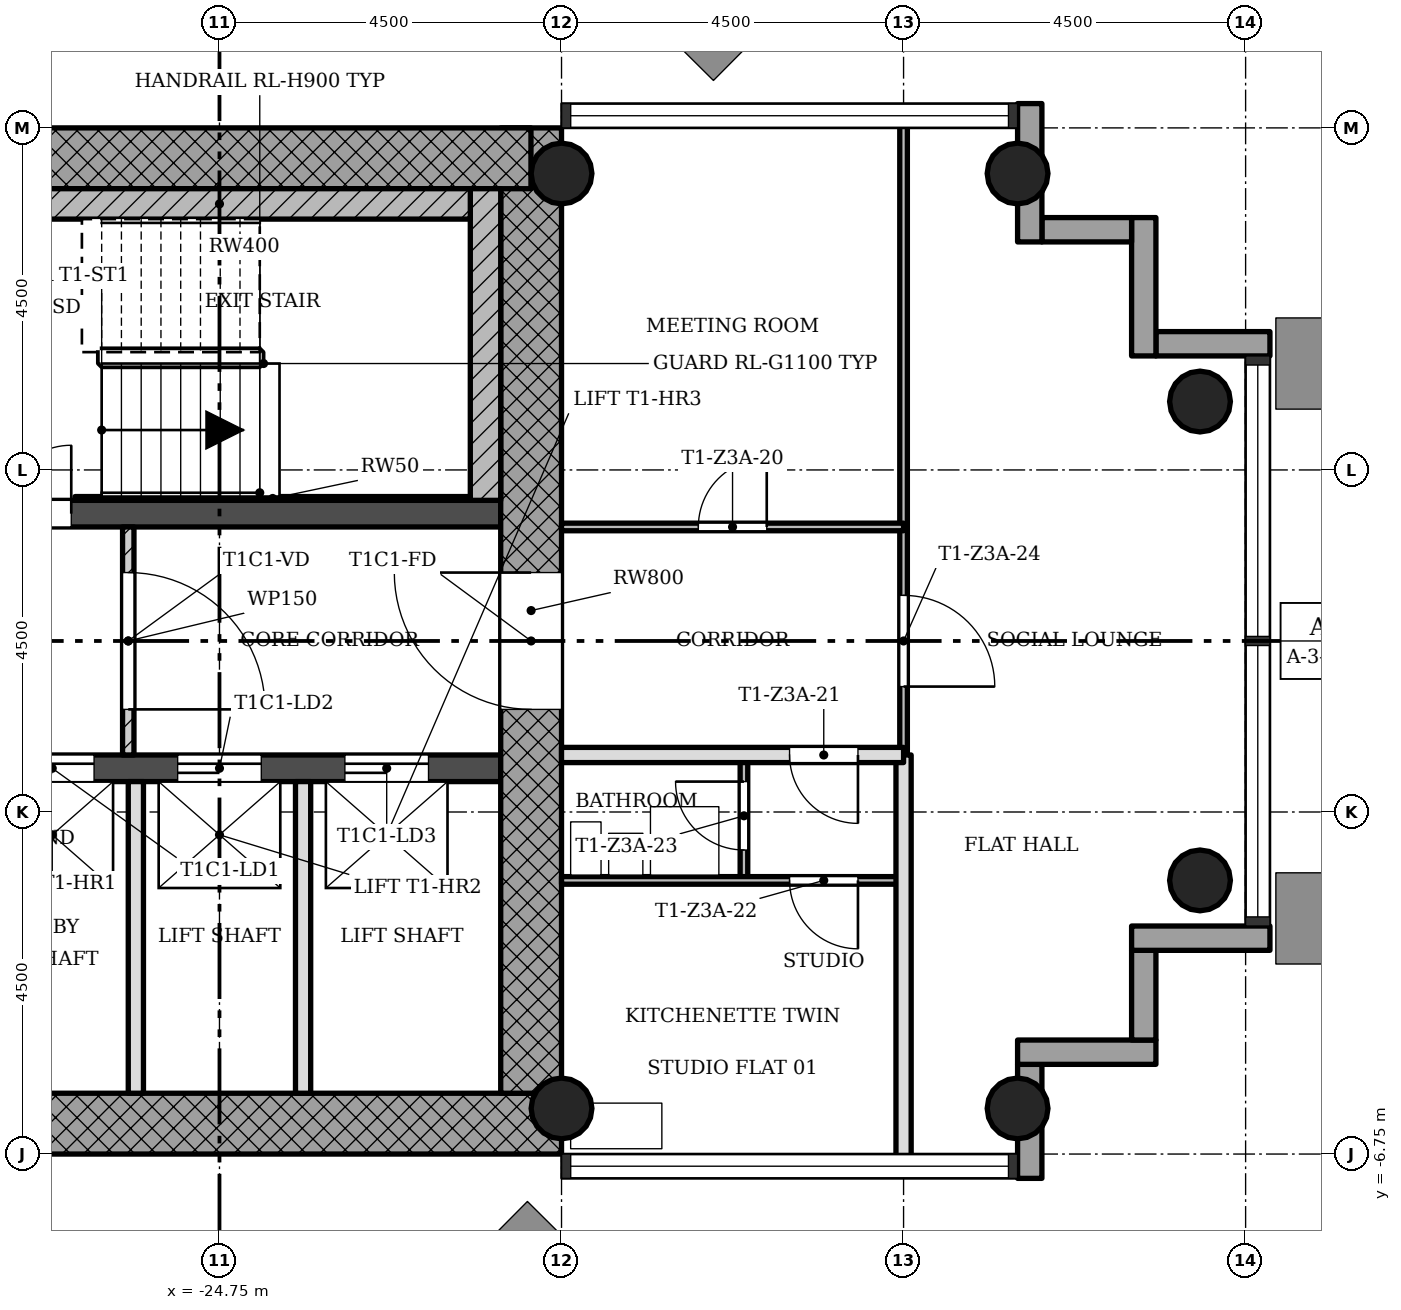
"""IFC4 building model, lengths in metres.
Left out: names, types, materials, properties, quantities, classifications, styles, units other than length and angle.
Written with IfcOpenShell. Run it as: python <this file> out.ifc"""

import sys

from ifc_helpers import new_model, si_unit, direction, frame, frame_2d, origin, origin_2d, place, context, subcontext, project, spatial, rectangle, hollow_circle, extrude, element, fill, save


model = new_model("IFC4")
c1 = context("Model", 3, precision=1e-05, world=origin(), true_north=direction((0.0, 1.0)))
c2 = subcontext(c1, "Body", "Model", "MODEL_VIEW")
j1 = project(units=[si_unit("LENGTHUNIT", "METRE"), si_unit("PLANEANGLEUNIT", "RADIAN")], contexts=[c1])
p1 = place(None, origin())
s1 = spatial("IfcSite", under=j1, at=p1, CompositionType="ELEMENT")
p2 = place(p1, origin())
s2 = spatial("IfcBuilding", under=s1, at=p2, CompositionType="ELEMENT")
p3 = place(p2, frame((0.0, 0.0, 137.1)))
s3 = spatial("IfcBuildingStorey", under=s2, at=p3, CompositionType="ELEMENT", Elevation=137.1)
p4 = place(p3, frame((-28.45, -6.35, 0.0), z_axis=(0.0, 0.0, 1.0), x_axis=(1.0, 0.0, 0.0)))
e1 = element("IfcWall", 1, at=p4, inside=s3, PredefinedType="SHEAR", context=c2, shape_type="SweptSolid", body=[
    extrude(rectangle(XDim=8.2, YDim=0.8, at=frame_2d((4.1, 0.0))), origin(), (0.0, 0.0, 1.0), 3.4),
])
p5 = place(p3, frame((-20.65, -5.95, 0.0), z_axis=(0.0, 0.0, 1.0), x_axis=(0.0, 1.0, 0.0)))
e2 = element("IfcWall", 2, at=p5, inside=s3, PredefinedType="SHEAR", context=c2, shape_type="SweptSolid", body=[
    extrude(rectangle(XDim=12.7, YDim=0.8, at=frame_2d((6.35, 0.0))), origin(), (0.0, 0.0, 1.0), 3.4),
])
p6 = place(p5, frame((5.05, 0.0, 0.0)))
e3 = element("IfcOpeningElement", 3, at=p6, cuts=e2, PredefinedType="OPENING", context=c2, shape_type="SweptSolid", body=[
    extrude(rectangle(XDim=1.8, YDim=2.1, at=frame_2d((0.9, 1.05))), frame((0.0, 0.41, 0.0), z_axis=(0.0, -1.0, 0.0), x_axis=(1.0, 0.0, 0.0)), (0.0, 0.0, 1.0), 0.82),
])
p7 = place(p3, frame((-20.652, 6.35, 0.0), z_axis=(0.0, 0.0, 1.0), x_axis=(-1.0, 0.0, 0.0)))
e4 = element("IfcWall", 4, at=p7, inside=s3, PredefinedType="SHEAR", context=c2, shape_type="SweptSolid", body=[
    extrude(rectangle(XDim=8.796, YDim=0.8, at=frame_2d((4.398, 0.0))), origin(), (0.0, 0.0, 1.0), 3.4),
])
p8 = place(p3, frame((-28.45, -1.675, 0.0), z_axis=(0.0, 0.0, 1.0), x_axis=(1.0, 0.0, 0.0)))
e5 = element("IfcWall", 5, at=p8, inside=s3, PredefinedType="SHEAR", context=c2, shape_type="SweptSolid", body=[
    extrude(rectangle(XDim=7.4, YDim=0.35, at=frame_2d((3.7, 0.0))), origin(), (0.0, 0.0, 1.0), 3.4),
])
p9 = place(p8, frame((0.95, 0.0, 0.0)))
e6 = element("IfcOpeningElement", 6, at=p9, cuts=e5, PredefinedType="OPENING", context=c2, shape_type="SweptSolid", body=[
    extrude(rectangle(XDim=1.1, YDim=2.1, at=frame_2d((0.55, 1.05))), frame((0.0, 0.185, 0.0), z_axis=(0.0, -1.0, 0.0), x_axis=(1.0, 0.0, 0.0)), (0.0, 0.0, 1.0), 0.37),
])
p10 = place(p8, frame((3.15, 0.0, 0.0)))
e7 = element("IfcOpeningElement", 7, at=p10, cuts=e5, PredefinedType="OPENING", context=c2, shape_type="SweptSolid", body=[
    extrude(rectangle(XDim=1.1, YDim=2.1, at=frame_2d((0.55, 1.05))), frame((0.0, 0.185, 0.0), z_axis=(0.0, -1.0, 0.0), x_axis=(1.0, 0.0, 0.0)), (0.0, 0.0, 1.0), 0.37),
])
p11 = place(p8, frame((5.35, 0.0, 0.0)))
e8 = element("IfcOpeningElement", 8, at=p11, cuts=e5, PredefinedType="OPENING", context=c2, shape_type="SweptSolid", body=[
    extrude(rectangle(XDim=1.1, YDim=2.1, at=frame_2d((0.55, 1.05))), frame((0.0, 0.185, 0.0), z_axis=(0.0, -1.0, 0.0), x_axis=(1.0, 0.0, 0.0)), (0.0, 0.0, 1.0), 0.37),
])
p12 = place(p3, frame((-28.45, 1.675, 0.0), z_axis=(0.0, 0.0, 1.0), x_axis=(1.0, 0.0, 0.0)))
e9 = element("IfcWall", 9, at=p12, inside=s3, PredefinedType="SHEAR", context=c2, shape_type="SweptSolid", body=[
    extrude(rectangle(XDim=7.4, YDim=0.35, at=frame_2d((3.7, 0.0))), origin(), (0.0, 0.0, 1.0), 3.4),
])
p13 = place(p12, frame((0.85, 0.0, 0.0)))
e10 = element("IfcOpeningElement", 10, at=p13, cuts=e9, PredefinedType="OPENING", context=c2, shape_type="SweptSolid", body=[
    extrude(rectangle(XDim=0.9, YDim=2.1, at=frame_2d((0.45, 1.05))), frame((0.0, 0.185, 0.0), z_axis=(0.0, -1.0, 0.0), x_axis=(1.0, 0.0, 0.0)), (0.0, 0.0, 1.0), 0.37),
])
for number, where, z_axis, x_axis in (
    (11, (-20.25, -6.15, 0.0), (0.0, 0.0, 1.0), (1.0, 0.0, 0.0)),
    (12, (-20.25, 6.15, 0.0), (0.0, 0.0, 1.0), (1.0, 0.0, 0.0)),
    (13, (-14.25, -6.15, 0.0), (0.0, 0.0, 1.0), (1.0, 0.0, 0.0)),
    (14, (-14.25, 6.15, 0.0), (0.0, 0.0, 1.0), (1.0, 0.0, 0.0)),
    (15, (-11.85, -3.15, 0.0), (0.0, 0.0, 1.0), (1.0, 0.0, 0.0)),
    (16, (-11.85, 3.15, 0.0), (0.0, 0.0, 1.0), (1.0, 0.0, 0.0)),
):
    element("IfcColumn", number, at=place(p3, frame(where, z_axis=z_axis, x_axis=x_axis)), inside=s3, PredefinedType="COLUMN", context=c2, shape_type="SweptSolid", body=[
        extrude(hollow_circle(Radius=0.4, WallThickness=0.028, at=origin_2d()), origin(), (0.0, 0.0, 1.0), 3.4),
    ])
p14 = place(p3, frame((-14.09, -7.07, -0.3), z_axis=(0.0, 0.0, 1.0), x_axis=(0.0, 1.0, 0.0)))
e17 = element("IfcWall", 17, at=p14, inside=s3, PredefinedType="STANDARD", context=c2, shape_type="SweptSolid", body=[
    extrude(rectangle(XDim=1.5, YDim=0.32, at=frame_2d((0.75, 0.0))), origin(), (0.0, 0.0, 1.0), 3.4),
])
p15 = place(p3, frame((-14.25, -5.41, -0.3), z_axis=(0.0, 0.0, 1.0), x_axis=(1.0, 0.0, 0.0)))
e18 = element("IfcWall", 18, at=p15, inside=s3, PredefinedType="STANDARD", context=c2, shape_type="SweptSolid", body=[
    extrude(rectangle(XDim=1.82, YDim=0.32, at=frame_2d((0.91, 0.0))), origin(), (0.0, 0.0, 1.0), 3.4),
])
p16 = place(p3, frame((-12.59, -5.25, -0.3), z_axis=(0.0, 0.0, 1.0), x_axis=(0.0, 1.0, 0.0)))
e19 = element("IfcWall", 19, at=p16, inside=s3, PredefinedType="STANDARD", context=c2, shape_type="SweptSolid", body=[
    extrude(rectangle(XDim=1.18, YDim=0.32, at=frame_2d((0.59, 0.0))), origin(), (0.0, 0.0, 1.0), 3.4),
])
p17 = place(p3, frame((-12.75, -3.91, -0.3), z_axis=(0.0, 0.0, 1.0), x_axis=(1.0, 0.0, 0.0)))
e20 = element("IfcWall", 20, at=p17, inside=s3, PredefinedType="STANDARD", context=c2, shape_type="SweptSolid", body=[
    extrude(rectangle(XDim=1.82, YDim=0.32, at=frame_2d((0.91, 0.0))), origin(), (0.0, 0.0, 1.0), 3.4),
])
p18 = place(p3, frame((-10.93, 3.91, -0.3), z_axis=(0.0, 0.0, 1.0), x_axis=(-1.0, 0.0, 0.0)))
e21 = element("IfcWall", 21, at=p18, inside=s3, PredefinedType="STANDARD", context=c2, shape_type="SweptSolid", body=[
    extrude(rectangle(XDim=1.5, YDim=0.32, at=frame_2d((0.75, 0.0))), origin(), (0.0, 0.0, 1.0), 3.4),
])
p19 = place(p3, frame((-12.59, 3.75, -0.3), z_axis=(0.0, 0.0, 1.0), x_axis=(0.0, 1.0, 0.0)))
e22 = element("IfcWall", 22, at=p19, inside=s3, PredefinedType="STANDARD", context=c2, shape_type="SweptSolid", body=[
    extrude(rectangle(XDim=1.82, YDim=0.32, at=frame_2d((0.91, 0.0))), origin(), (0.0, 0.0, 1.0), 3.4),
])
p20 = place(p3, frame((-12.75, 5.41, -0.3), z_axis=(0.0, 0.0, 1.0), x_axis=(-1.0, 0.0, 0.0)))
e23 = element("IfcWall", 23, at=p20, inside=s3, PredefinedType="STANDARD", context=c2, shape_type="SweptSolid", body=[
    extrude(rectangle(XDim=1.18, YDim=0.32, at=frame_2d((0.59, 0.0))), origin(), (0.0, 0.0, 1.0), 3.4),
])
p21 = place(p3, frame((-14.09, 5.25, -0.3), z_axis=(0.0, 0.0, 1.0), x_axis=(0.0, 1.0, 0.0)))
e24 = element("IfcWall", 24, at=p21, inside=s3, PredefinedType="STANDARD", context=c2, shape_type="SweptSolid", body=[
    extrude(rectangle(XDim=1.82, YDim=0.32, at=frame_2d((0.91, 0.0))), origin(), (0.0, 0.0, 1.0), 3.4),
])
p22 = place(p3, frame((-25.95, -1.5, 0.0), z_axis=(0.0, 0.0, 1.0), x_axis=(0.0, 1.0, 0.0)))
e25 = element("IfcWall", 25, at=p22, inside=s3, PredefinedType="PARTITIONING", context=c2, shape_type="SweptSolid", body=[
    extrude(rectangle(XDim=3.0, YDim=0.15, at=frame_2d((1.5, 0.0))), origin(), (0.0, 0.0, 1.0), 3.0),
])
p23 = place(p22, frame((0.6, 0.0, 0.0)))
e26 = element("IfcOpeningElement", 26, at=p23, cuts=e25, PredefinedType="OPENING", context=c2, shape_type="SweptSolid", body=[
    extrude(rectangle(XDim=1.8, YDim=2.1, at=frame_2d((0.9, 1.05))), frame((0.0, 0.085, 0.0), z_axis=(0.0, -1.0, 0.0), x_axis=(1.0, 0.0, 0.0)), (0.0, 0.0, 1.0), 0.17),
])
for number, where, z_axis, x_axis in (
    (27, (-25.85, -5.95, 0.0), (0.0, 0.0, 1.0), (0.0, 1.0, 0.0)),
    (28, (-23.65, -5.95, 0.0), (0.0, 0.0, 1.0), (0.0, 1.0, 0.0)),
):
    element("IfcWall", number, at=place(p3, frame(where, z_axis=z_axis, x_axis=x_axis)), inside=s3, PredefinedType="SOLIDWALL", context=c2, shape_type="SweptSolid", body=[
        extrude(rectangle(XDim=4.1, YDim=0.2, at=frame_2d((2.05, 0.0))), origin(), (0.0, 0.0, 1.0), 3.0),
    ])
p24 = place(p3, frame((-17.85, -3.15, 0.0), z_axis=(0.0, 0.0, 1.0), x_axis=(0.0, 1.0, 0.0)))
e29 = element("IfcWall", 29, at=p24, inside=s3, PredefinedType="PARTITIONING", context=c2, shape_type="SweptSolid", body=[
    extrude(rectangle(XDim=1.65, YDim=0.1, at=frame_2d((0.825, 0.0))), origin(), (0.0, 0.0, 1.0), 3.0),
])
p25 = place(p24, frame((0.4, 0.0, 0.0)))
e30 = element("IfcOpeningElement", 30, at=p25, cuts=e29, PredefinedType="OPENING", context=c2, shape_type="SweptSolid", body=[
    extrude(rectangle(XDim=0.9, YDim=2.1, at=frame_2d((0.45, 1.05))), frame((0.0, 0.06, 0.0), z_axis=(0.0, -1.0, 0.0), x_axis=(1.0, 0.0, 0.0)), (0.0, 0.0, 1.0), 0.12),
])
p26 = place(p3, frame((-15.75, -1.5, 0.0), z_axis=(0.0, 0.0, 1.0), x_axis=(0.0, 1.0, 0.0)))
e31 = element("IfcWall", 31, at=p26, inside=s3, PredefinedType="PARTITIONING", context=c2, shape_type="SweptSolid", body=[
    extrude(rectangle(XDim=8.35, YDim=0.1, at=frame_2d((4.175, 0.0))), origin(), (0.0, 0.0, 1.0), 3.0),
])
p27 = place(p26, frame((0.9, 0.0, 0.0)))
e32 = element("IfcOpeningElement", 32, at=p27, cuts=e31, PredefinedType="OPENING", context=c2, shape_type="SweptSolid", body=[
    extrude(rectangle(XDim=1.2, YDim=2.1, at=frame_2d((0.6, 1.05))), frame((0.0, 0.06, 0.0), z_axis=(0.0, -1.0, 0.0), x_axis=(1.0, 0.0, 0.0)), (0.0, 0.0, 1.0), 0.12),
])
p28 = place(p3, frame((-15.75, -6.85, 0.0), z_axis=(0.0, 0.0, 1.0), x_axis=(0.0, 1.0, 0.0)))
e33 = element("IfcWall", 33, at=p28, inside=s3, PredefinedType="SOLIDWALL", context=c2, shape_type="SweptSolid", body=[
    extrude(rectangle(XDim=5.35, YDim=0.2, at=frame_2d((2.675, 0.0))), origin(), (0.0, 0.0, 1.0), 3.0),
])
p29 = place(p3, frame((-20.25, -3.15, 0.0), z_axis=(0.0, 0.0, 1.0), x_axis=(1.0, 0.0, 0.0)))
e34 = element("IfcWall", 34, at=p29, inside=s3, PredefinedType="PARTITIONING", context=c2, shape_type="SweptSolid", body=[
    extrude(rectangle(XDim=4.5, YDim=0.1, at=frame_2d((2.25, 0.0))), origin(), (0.0, 0.0, 1.0), 3.0),
])
p30 = place(p29, frame((3.0, 0.0, 0.0)))
e35 = element("IfcOpeningElement", 35, at=p30, cuts=e34, PredefinedType="OPENING", context=c2, shape_type="SweptSolid", body=[
    extrude(rectangle(XDim=0.9, YDim=2.1, at=frame_2d((0.45, 1.05))), frame((0.0, 0.06, 0.0), z_axis=(0.0, -1.0, 0.0), x_axis=(1.0, 0.0, 0.0)), (0.0, 0.0, 1.0), 0.12),
])
p31 = place(p3, frame((-20.25, -1.5, 0.0), z_axis=(0.0, 0.0, 1.0), x_axis=(1.0, 0.0, 0.0)))
e36 = element("IfcWall", 36, at=p31, inside=s3, PredefinedType="SOLIDWALL", context=c2, shape_type="SweptSolid", body=[
    extrude(rectangle(XDim=4.5, YDim=0.2, at=frame_2d((2.25, 0.0))), origin(), (0.0, 0.0, 1.0), 3.0),
])
p32 = place(p31, frame((3.0, 0.0, 0.0)))
e37 = element("IfcOpeningElement", 37, at=p32, cuts=e36, PredefinedType="OPENING", context=c2, shape_type="SweptSolid", body=[
    extrude(rectangle(XDim=0.9, YDim=2.1, at=frame_2d((0.45, 1.05))), frame((0.0, 0.11, 0.0), z_axis=(0.0, -1.0, 0.0), x_axis=(1.0, 0.0, 0.0)), (0.0, 0.0, 1.0), 0.22),
])
p33 = place(p3, frame((-20.25, 1.5, 0.0), z_axis=(0.0, 0.0, 1.0), x_axis=(1.0, 0.0, 0.0)))
e38 = element("IfcWall", 38, at=p33, inside=s3, PredefinedType="PARTITIONING", context=c2, shape_type="SweptSolid", body=[
    extrude(rectangle(XDim=4.5, YDim=0.1, at=frame_2d((2.25, 0.0))), origin(), (0.0, 0.0, 1.0), 3.0),
])
p34 = place(p33, frame((1.8, 0.0, 0.0)))
e39 = element("IfcOpeningElement", 39, at=p34, cuts=e38, PredefinedType="OPENING", context=c2, shape_type="SweptSolid", body=[
    extrude(rectangle(XDim=0.9, YDim=2.1, at=frame_2d((0.45, 1.05))), frame((0.0, 0.06, 0.0), z_axis=(0.0, -1.0, 0.0), x_axis=(1.0, 0.0, 0.0)), (0.0, 0.0, 1.0), 0.12),
])
p35 = place(p3, frame((-21.25, 1.85, 0.0), z_axis=(0.0, 0.0, 1.0), x_axis=(0.0, 1.0, 0.0)))
e40 = element("IfcWall", 40, at=p35, inside=s3, PredefinedType="SHEAR", context=c2, shape_type="SweptSolid", body=[
    extrude(rectangle(XDim=4.1, YDim=0.4, at=frame_2d((2.05, 0.0))), origin(), (0.0, 0.0, 1.0), 3.4),
])
p36 = place(p3, frame((-28.05, 5.75, 0.0), z_axis=(0.0, 0.0, 1.0), x_axis=(1.0, 0.0, 0.0)))
e41 = element("IfcWall", 41, at=p36, inside=s3, PredefinedType="SHEAR", context=c2, shape_type="SweptSolid", body=[
    extrude(rectangle(XDim=6.6, YDim=0.4, at=frame_2d((3.3, 0.0))), origin(), (0.0, 0.0, 1.0), 3.4),
])
p37 = place(p3, frame((-26.65, 1.875, 0.0), z_axis=(0.0, 0.0, 1.0), x_axis=(1.0, 0.0, 0.0)))
e42 = element("IfcWall", 42, at=p37, inside=s3, PredefinedType="SHEAR", context=c2, shape_type="SweptSolid", body=[
    extrude(rectangle(XDim=5.2, YDim=0.05, at=frame_2d((2.6, 0.0))), origin(), (0.0, 0.0, 1.0), 3.4),
])
p38 = place(p23, origin())
e43 = element("IfcDoor", 43, at=p38, inside=s3, OperationType="SINGLE_SWING_LEFT", PredefinedType="DOOR", context=c2, shape_type="SweptSolid", body=[
    extrude(rectangle(XDim=1.8, YDim=2.1, at=frame_2d((0.9, 1.05))), frame((0.0, 0.025, 0.0), z_axis=(0.0, -1.0, 0.0), x_axis=(1.0, 0.0, 0.0)), (0.0, 0.0, 1.0), 0.05),
])
fill(e26, e43)
p39 = place(p34, origin())
e44 = element("IfcDoor", 44, at=p39, inside=s3, OperationType="SINGLE_SWING_LEFT", PredefinedType="DOOR", context=c2, shape_type="SweptSolid", body=[
    extrude(rectangle(XDim=0.9, YDim=2.1, at=frame_2d((0.45, 1.05))), frame((0.0, 0.025, 0.0), z_axis=(0.0, -1.0, 0.0), x_axis=(1.0, 0.0, 0.0)), (0.0, 0.0, 1.0), 0.05),
])
fill(e39, e44)
p40 = place(p32, origin())
e45 = element("IfcDoor", 45, at=p40, inside=s3, OperationType="SINGLE_SWING_RIGHT", PredefinedType="DOOR", context=c2, shape_type="SweptSolid", body=[
    extrude(rectangle(XDim=0.9, YDim=2.1, at=frame_2d((0.45, 1.05))), frame((0.0, 0.025, 0.0), z_axis=(0.0, -1.0, 0.0), x_axis=(1.0, 0.0, 0.0)), (0.0, 0.0, 1.0), 0.05),
])
fill(e37, e45)
p41 = place(p30, origin())
e46 = element("IfcDoor", 46, at=p41, inside=s3, OperationType="SINGLE_SWING_RIGHT", PredefinedType="DOOR", context=c2, shape_type="SweptSolid", body=[
    extrude(rectangle(XDim=0.9, YDim=2.1, at=frame_2d((0.45, 1.05))), frame((0.0, 0.025, 0.0), z_axis=(0.0, -1.0, 0.0), x_axis=(1.0, 0.0, 0.0)), (0.0, 0.0, 1.0), 0.05),
])
fill(e35, e46)
p42 = place(p25, origin())
e47 = element("IfcDoor", 47, at=p42, inside=s3, OperationType="SINGLE_SWING_LEFT", PredefinedType="DOOR", context=c2, shape_type="SweptSolid", body=[
    extrude(rectangle(XDim=0.9, YDim=2.1, at=frame_2d((0.45, 1.05))), frame((0.0, 0.025, 0.0), z_axis=(0.0, -1.0, 0.0), x_axis=(1.0, 0.0, 0.0)), (0.0, 0.0, 1.0), 0.05),
])
fill(e30, e47)
p43 = place(p27, origin())
e48 = element("IfcDoor", 48, at=p43, inside=s3, OperationType="SINGLE_SWING_LEFT", PredefinedType="DOOR", context=c2, shape_type="SweptSolid", body=[
    extrude(rectangle(XDim=1.2, YDim=2.1, at=frame_2d((0.6, 1.05))), frame((0.0, 0.025, 0.0), z_axis=(0.0, -1.0, 0.0), x_axis=(1.0, 0.0, 0.0)), (0.0, 0.0, 1.0), 0.05),
])
fill(e32, e48)
p44 = place(p13, origin())
e49 = element("IfcDoor", 49, at=p44, inside=s3, OperationType="SINGLE_SWING_LEFT", PredefinedType="DOOR", context=c2, shape_type="SweptSolid", body=[
    extrude(rectangle(XDim=0.9, YDim=2.1, at=frame_2d((0.45, 1.05))), frame((0.0, 0.025, 0.0), z_axis=(0.0, -1.0, 0.0), x_axis=(1.0, 0.0, 0.0)), (0.0, 0.0, 1.0), 0.05),
])
fill(e10, e49)
p45 = place(p9, origin())
e50 = element("IfcDoor", 50, at=p45, inside=s3, OperationType="SLIDING_TO_LEFT", PredefinedType="DOOR", context=c2, shape_type="SweptSolid", body=[
    extrude(rectangle(XDim=1.1, YDim=2.1, at=frame_2d((0.55, 1.05))), frame((0.0, 0.025, 0.0), z_axis=(0.0, -1.0, 0.0), x_axis=(1.0, 0.0, 0.0)), (0.0, 0.0, 1.0), 0.05),
])
fill(e6, e50)
p46 = place(p10, origin())
e51 = element("IfcDoor", 51, at=p46, inside=s3, OperationType="SLIDING_TO_LEFT", PredefinedType="DOOR", context=c2, shape_type="SweptSolid", body=[
    extrude(rectangle(XDim=1.1, YDim=2.1, at=frame_2d((0.55, 1.05))), frame((0.0, 0.025, 0.0), z_axis=(0.0, -1.0, 0.0), x_axis=(1.0, 0.0, 0.0)), (0.0, 0.0, 1.0), 0.05),
])
fill(e7, e51)
p47 = place(p11, origin())
e52 = element("IfcDoor", 52, at=p47, inside=s3, OperationType="SLIDING_TO_LEFT", PredefinedType="DOOR", context=c2, shape_type="SweptSolid", body=[
    extrude(rectangle(XDim=1.1, YDim=2.1, at=frame_2d((0.55, 1.05))), frame((0.0, 0.025, 0.0), z_axis=(0.0, -1.0, 0.0), x_axis=(1.0, 0.0, 0.0)), (0.0, 0.0, 1.0), 0.05),
])
fill(e8, e52)
p48 = place(p6, origin())
e53 = element("IfcDoor", 53, at=p48, inside=s3, OperationType="SINGLE_SWING_LEFT", PredefinedType="DOOR", context=c2, shape_type="SweptSolid", body=[
    extrude(rectangle(XDim=1.8, YDim=2.1, at=frame_2d((0.9, 1.05))), frame((0.0, 0.025, 0.0), z_axis=(0.0, -1.0, 0.0), x_axis=(1.0, 0.0, 0.0)), (0.0, 0.0, 1.0), 0.05),
])
fill(e3, e53)
save(model, sys.argv[1])
